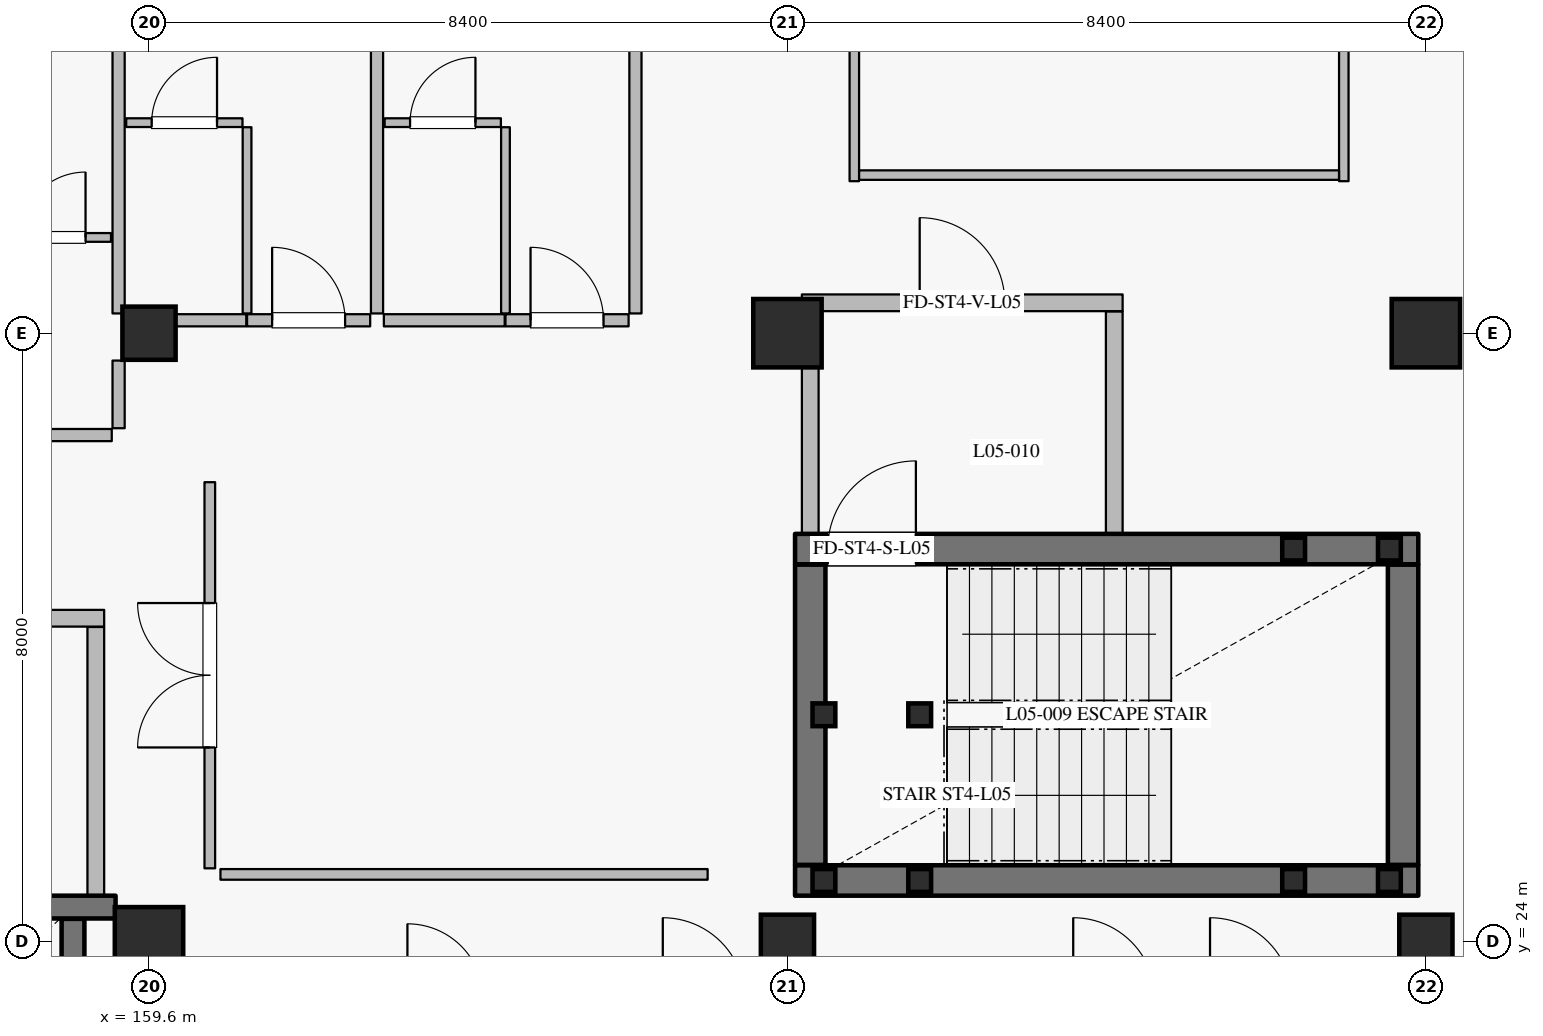
"""IFC4 building model, lengths in metres.
Left out: names, types, materials, properties, quantities, classifications, styles, units other than length and angle.
Written with IfcOpenShell. Run it as: python <this file> out.ifc"""

import sys

from ifc_helpers import new_model, si_unit, direction, frame, frame_2d, origin, origin_2d, place, context, subcontext, project, spatial, rectangle, hollow_rectangle, extrude, element, fill, save


model = new_model("IFC4")
c1 = context("Model", 3, precision=1e-05, world=origin(), true_north=direction((0.0, 1.0)))
c2 = subcontext(c1, "Body", "Model", "MODEL_VIEW")
j1 = project(units=[si_unit("LENGTHUNIT", "METRE"), si_unit("PLANEANGLEUNIT", "RADIAN")], contexts=[c1])
p1 = place(None, origin())
s1 = spatial("IfcSite", under=j1, at=p1, CompositionType="ELEMENT")
p2 = place(p1, origin())
s2 = spatial("IfcBuilding", under=s1, at=p2, CompositionType="ELEMENT")
p3 = place(p2, frame((0.0, 0.0, 25.2)))
s3 = spatial("IfcBuildingStorey", under=s2, at=p3, CompositionType="ELEMENT", Elevation=25.2)
for number, where, z_axis, x_axis in (
    (1, (159.6, 24.0, 0.0), (0.0, 0.0, 1.0), (1.0, 0.0, 0.0)),
    (2, (168.0, 32.0, 0.0), (0.0, 0.0, 1.0), (1.0, 0.0, 0.0)),
    (3, (176.4, 32.0, 0.0), (0.0, 0.0, 1.0), (1.0, 0.0, 0.0)),
):
    element("IfcColumn", number, at=place(p3, frame(where, z_axis=z_axis, x_axis=x_axis)), inside=s3, PredefinedType="COLUMN", context=c2, shape_type="SweptSolid", body=[
        extrude(rectangle(XDim=0.9, YDim=0.9, at=origin_2d()), origin(), (0.0, 0.0, 1.0), 3.6),
    ])
for number, where, z_axis, x_axis in (
    (4, (159.6, 32.0, 0.0), (0.0, 0.0, 1.0), (1.0, 0.0, 0.0)),
    (5, (168.0, 24.0, 0.0), (0.0, 0.0, 1.0), (1.0, 0.0, 0.0)),
    (6, (176.4, 24.0, 0.0), (0.0, 0.0, 1.0), (1.0, 0.0, 0.0)),
):
    element("IfcColumn", number, at=place(p3, frame(where, z_axis=z_axis, x_axis=x_axis)), inside=s3, PredefinedType="COLUMN", context=c2, shape_type="SweptSolid", body=[
        extrude(rectangle(XDim=0.7, YDim=0.7, at=origin_2d()), origin(), (0.0, 0.0, 1.0), 3.6),
    ])
p4 = place(p3, frame((158.6, 21.705, 0.0), z_axis=(0.0, 0.0, 1.0), x_axis=(0.0, 1.0, 0.0)))
e7 = element("IfcWall", 7, at=p4, inside=s3, PredefinedType="SHEAR", context=c2, shape_type="SweptSolid", body=[
    extrude(rectangle(XDim=2.59, YDim=0.3, at=frame_2d((1.295, 0.0))), origin(), (0.0, 0.0, 1.0), 3.335),
])
p5 = place(p3, frame((159.16, 24.45, 0.0), z_axis=(0.0, 0.0, 1.0), x_axis=(-1.0, 0.0, 0.0)))
e8 = element("IfcWall", 8, at=p5, inside=s3, PredefinedType="SHEAR", context=c2, shape_type="SweptSolid", body=[
    extrude(rectangle(XDim=3.91, YDim=0.3, at=frame_2d((1.955, 0.0))), origin(), (0.0, 0.0, 1.0), 3.335),
])
p6 = place(p5, frame((1.535, 0.0, 0.0)))
e9 = element("IfcOpeningElement", 9, at=p6, cuts=e8, PredefinedType="OPENING", context=c2, shape_type="SweptSolid", body=[
    extrude(rectangle(XDim=1.25, YDim=2.25, at=frame_2d((0.625, 1.125))), frame((0.0, 0.16, 0.0), z_axis=(0.0, -1.0, 0.0), x_axis=(1.0, 0.0, 0.0)), (0.0, 0.0, 1.0), 0.32),
])
p7 = place(p3, frame((158.9, 24.605, 0.0), z_axis=(0.0, 0.0, 1.0), x_axis=(0.0, 1.0, 0.0)))
e10 = element("IfcWall", 10, at=p7, inside=s3, PredefinedType="PARTITIONING", context=c2, shape_type="SweptSolid", body=[
    extrude(rectangle(XDim=3.53, YDim=0.22, at=frame_2d((1.765, 0.0))), origin(), (0.0, 0.0, 1.0), 3.335),
])
p8 = place(p3, frame((154.99, 28.25, 0.0), z_axis=(0.0, 0.0, 1.0), x_axis=(1.0, 0.0, 0.0)))
e11 = element("IfcWall", 11, at=p8, inside=s3, PredefinedType="PARTITIONING", context=c2, shape_type="SweptSolid", body=[
    extrude(rectangle(XDim=4.02, YDim=0.22, at=frame_2d((2.01, 0.0))), origin(), (0.0, 0.0, 1.0), 3.335),
])
p9 = place(p8, frame((1.39, 0.0, 0.0)))
e12 = element("IfcOpeningElement", 12, at=p9, cuts=e11, PredefinedType="OPENING", context=c2, shape_type="SweptSolid", body=[
    extrude(rectangle(XDim=1.24, YDim=2.2, at=frame_2d((0.62, 1.1))), frame((0.0, 0.12, 0.0), z_axis=(0.0, -1.0, 0.0), x_axis=(1.0, 0.0, 0.0)), (0.0, 0.0, 1.0), 0.24),
])
p10 = place(p3, frame((168.1, 24.8, 0.0), z_axis=(0.0, 0.0, 1.0), x_axis=(1.0, 0.0, 0.0)))
e13 = element("IfcWall", 13, at=p10, inside=s3, PredefinedType="SHEAR", context=c2, shape_type="SweptSolid", body=[
    extrude(rectangle(XDim=8.2, YDim=0.4, at=frame_2d((4.1, 0.0))), origin(), (0.0, 0.0, 1.0), 3.335),
])
p11 = place(p3, frame((176.1, 25.005, 0.0), z_axis=(0.0, 0.0, 1.0), x_axis=(0.0, 1.0, 0.0)))
e14 = element("IfcWall", 14, at=p11, inside=s3, PredefinedType="SHEAR", context=c2, shape_type="SweptSolid", body=[
    extrude(rectangle(XDim=3.95, YDim=0.4, at=frame_2d((1.975, 0.0))), origin(), (0.0, 0.0, 1.0), 3.335),
])
p12 = place(p3, frame((168.1, 29.16, 0.0), z_axis=(0.0, 0.0, 1.0), x_axis=(1.0, 0.0, 0.0)))
e15 = element("IfcWall", 15, at=p12, inside=s3, PredefinedType="SHEAR", context=c2, shape_type="SweptSolid", body=[
    extrude(rectangle(XDim=8.2, YDim=0.4, at=frame_2d((4.1, 0.0))), origin(), (0.0, 0.0, 1.0), 3.335),
])
p13 = place(p12, frame((0.43, 0.0, 0.0)))
e16 = element("IfcOpeningElement", 16, at=p13, cuts=e15, PredefinedType="OPENING", context=c2, shape_type="SweptSolid", body=[
    extrude(rectangle(XDim=1.16, YDim=2.2, at=frame_2d((0.58, 1.1))), frame((0.0, 0.21, 0.0), z_axis=(0.0, -1.0, 0.0), x_axis=(1.0, 0.0, 0.0)), (0.0, 0.0, 1.0), 0.42),
])
p14 = place(p3, frame((168.3, 25.005, 0.0), z_axis=(0.0, 0.0, 1.0), x_axis=(0.0, 1.0, 0.0)))
e17 = element("IfcWall", 17, at=p14, inside=s3, PredefinedType="SHEAR", context=c2, shape_type="SweptSolid", body=[
    extrude(rectangle(XDim=3.95, YDim=0.4, at=frame_2d((1.975, 0.0))), origin(), (0.0, 0.0, 1.0), 3.335),
])
p15 = place(p3, frame((168.3, 29.365, 0.0), z_axis=(0.0, 0.0, 1.0), x_axis=(0.0, 1.0, 0.0)))
e18 = element("IfcWall", 18, at=p15, inside=s3, PredefinedType="PARTITIONING", context=c2, shape_type="SweptSolid", body=[
    extrude(rectangle(XDim=2.92, YDim=0.22, at=frame_2d((1.46, 0.0))), origin(), (0.0, 0.0, 1.0), 3.335),
])
p16 = place(p3, frame((168.19, 32.4, 0.0), z_axis=(0.0, 0.0, 1.0), x_axis=(1.0, 0.0, 0.0)))
e19 = element("IfcWall", 19, at=p16, inside=s3, PredefinedType="PARTITIONING", context=c2, shape_type="SweptSolid", body=[
    extrude(rectangle(XDim=4.22, YDim=0.22, at=frame_2d((2.11, 0.0))), origin(), (0.0, 0.0, 1.0), 3.335),
])
p17 = place(p16, frame((1.55, 0.0, 0.0)))
e20 = element("IfcOpeningElement", 20, at=p17, cuts=e19, PredefinedType="OPENING", context=c2, shape_type="SweptSolid", body=[
    extrude(rectangle(XDim=1.12, YDim=2.2, at=frame_2d((0.56, 1.1))), frame((0.0, 0.12, 0.0), z_axis=(0.0, -1.0, 0.0), x_axis=(1.0, 0.0, 0.0)), (0.0, 0.0, 1.0), 0.24),
])
p18 = place(p3, frame((172.3, 29.365, 0.0), z_axis=(0.0, 0.0, 1.0), x_axis=(0.0, 1.0, 0.0)))
e21 = element("IfcWall", 21, at=p18, inside=s3, PredefinedType="PARTITIONING", context=c2, shape_type="SweptSolid", body=[
    extrude(rectangle(XDim=2.92, YDim=0.22, at=frame_2d((1.46, 0.0))), origin(), (0.0, 0.0, 1.0), 3.335),
])
for number, where, z_axis, x_axis in (
    (22, (168.48, 24.8, 0.0), (0.0, 0.0, 1.0), (1.0, 0.0, 0.0)),
    (23, (168.48, 26.98, 0.0), (0.0, 0.0, 1.0), (1.0, 0.0, 0.0)),
    (24, (169.74, 24.8, 0.0), (0.0, 0.0, 1.0), (1.0, 0.0, 0.0)),
    (25, (169.74, 26.98, 0.0), (0.0, 0.0, 1.0), (1.0, 0.0, 0.0)),
):
    element("IfcColumn", number, at=place(p3, frame(where, z_axis=z_axis, x_axis=x_axis)), inside=s3, PredefinedType="COLUMN", context=c2, shape_type="SweptSolid", body=[
        extrude(hollow_rectangle(XDim=0.3, YDim=0.3, WallThickness=0.012, at=origin_2d()), origin(), (0.0, 0.0, 1.0), 3.42),
    ])
for number, where, z_axis, x_axis in (
    (26, (174.66, 24.8, -2.1), (0.0, 0.0, 1.0), (1.0, 0.0, 0.0)),
    (27, (174.66, 29.16, -2.1), (0.0, 0.0, 1.0), (1.0, 0.0, 0.0)),
    (28, (175.92, 24.8, -2.1), (0.0, 0.0, 1.0), (1.0, 0.0, 0.0)),
    (29, (175.92, 29.16, -2.1), (0.0, 0.0, 1.0), (1.0, 0.0, 0.0)),
):
    element("IfcColumn", number, at=place(p3, frame(where, z_axis=z_axis, x_axis=x_axis)), inside=s3, PredefinedType="COLUMN", context=c2, shape_type="SweptSolid", body=[
        extrude(hollow_rectangle(XDim=0.3, YDim=0.3, WallThickness=0.012, at=origin_2d()), origin(), (0.0, 0.0, 1.0), 3.72),
    ])
p19 = place(p3, frame((157.52, 30.66, 0.0), z_axis=(0.0, 0.0, 1.0), x_axis=(1.0, 0.0, 0.0)))
e30 = element("IfcWall", 30, at=p19, inside=s3, PredefinedType="PARTITIONING", context=c2, shape_type="SweptSolid", body=[
    extrude(rectangle(XDim=1.59, YDim=0.16, at=frame_2d((0.795, 0.0))), origin(), (0.0, 0.0, 1.0), 3.335),
])
p20 = place(p3, frame((157.57, 33.26, 0.0), z_axis=(0.0, 0.0, 1.0), x_axis=(1.0, 0.0, 0.0)))
e31 = element("IfcWall", 31, at=p20, inside=s3, PredefinedType="PARTITIONING", context=c2, shape_type="SweptSolid", body=[
    extrude(rectangle(XDim=1.53, YDim=0.115, at=frame_2d((0.765, 0.0))), origin(), (0.0, 0.0, 1.0), 3.335),
])
p21 = place(p20, frame((0.335, 0.0, 0.0)))
e32 = element("IfcOpeningElement", 32, at=p21, cuts=e31, PredefinedType="OPENING", context=c2, shape_type="SweptSolid", body=[
    extrude(rectangle(XDim=0.86, YDim=2.12, at=frame_2d((0.43, 1.06))), frame((0.0, 0.067, 0.0), z_axis=(0.0, -1.0, 0.0), x_axis=(1.0, 0.0, 0.0)), (0.0, 0.0, 1.0), 0.135),
])
p22 = place(p3, frame((159.2, 30.75, 0.0), z_axis=(0.0, 0.0, 1.0), x_axis=(0.0, 1.0, 0.0)))
e33 = element("IfcWall", 33, at=p22, inside=s3, PredefinedType="PARTITIONING", context=c2, shape_type="SweptSolid", body=[
    extrude(rectangle(XDim=0.89, YDim=0.16, at=frame_2d((0.445, 0.0))), origin(), (0.0, 0.0, 1.0), 3.335),
])
p23 = place(p3, frame((159.29, 32.17, 0.0), z_axis=(0.0, 0.0, 1.0), x_axis=(1.0, 0.0, 0.0)))
e34 = element("IfcWall", 34, at=p23, inside=s3, PredefinedType="PARTITIONING", context=c2, shape_type="SweptSolid", body=[
    extrude(rectangle(XDim=1.59, YDim=0.16, at=frame_2d((0.795, 0.0))), origin(), (0.0, 0.0, 1.0), 3.335),
])
p24 = place(p3, frame((160.89, 32.17, 0.0), z_axis=(0.0, 0.0, 1.0), x_axis=(1.0, 0.0, 0.0)))
e35 = element("IfcWall", 35, at=p24, inside=s3, PredefinedType="PARTITIONING", context=c2, shape_type="SweptSolid", body=[
    extrude(rectangle(XDim=1.62, YDim=0.16, at=frame_2d((0.81, 0.0))), origin(), (0.0, 0.0, 1.0), 3.335),
])
p25 = place(p24, frame((0.33, 0.0, 0.0)))
e36 = element("IfcOpeningElement", 36, at=p25, cuts=e35, PredefinedType="OPENING", context=c2, shape_type="SweptSolid", body=[
    extrude(rectangle(XDim=0.96, YDim=2.2, at=frame_2d((0.48, 1.1))), frame((0.0, 0.09, 0.0), z_axis=(0.0, -1.0, 0.0), x_axis=(1.0, 0.0, 0.0)), (0.0, 0.0, 1.0), 0.18),
])
p26 = place(p3, frame((160.89, 32.26, 0.0), z_axis=(0.0, 0.0, 1.0), x_axis=(0.0, 1.0, 0.0)))
e37 = element("IfcWall", 37, at=p26, inside=s3, PredefinedType="PARTITIONING", context=c2, shape_type="SweptSolid", body=[
    extrude(rectangle(XDim=2.45, YDim=0.115, at=frame_2d((1.225, 0.0))), origin(), (0.0, 0.0, 1.0), 3.335),
])
p27 = place(p3, frame((159.3, 34.77, 0.0), z_axis=(0.0, 0.0, 1.0), x_axis=(1.0, 0.0, 0.0)))
e38 = element("IfcWall", 38, at=p27, inside=s3, PredefinedType="PARTITIONING", context=c2, shape_type="SweptSolid", body=[
    extrude(rectangle(XDim=1.53, YDim=0.115, at=frame_2d((0.765, 0.0))), origin(), (0.0, 0.0, 1.0), 3.335),
])
p28 = place(p27, frame((0.335, 0.0, 0.0)))
e39 = element("IfcOpeningElement", 39, at=p28, cuts=e38, PredefinedType="OPENING", context=c2, shape_type="SweptSolid", body=[
    extrude(rectangle(XDim=0.86, YDim=2.12, at=frame_2d((0.43, 1.06))), frame((0.0, 0.067, 0.0), z_axis=(0.0, -1.0, 0.0), x_axis=(1.0, 0.0, 0.0)), (0.0, 0.0, 1.0), 0.135),
])
p29 = place(p3, frame((159.2, 32.26, 0.0), z_axis=(0.0, 0.0, 1.0), x_axis=(0.0, 1.0, 0.0)))
e40 = element("IfcWall", 40, at=p29, inside=s3, PredefinedType="PARTITIONING", context=c2, shape_type="SweptSolid", body=[
    extrude(rectangle(XDim=7.4, YDim=0.16, at=frame_2d((3.7, 0.0))), origin(), (0.0, 0.0, 1.0), 3.335),
])
p30 = place(p3, frame((162.69, 32.17, 0.0), z_axis=(0.0, 0.0, 1.0), x_axis=(1.0, 0.0, 0.0)))
e41 = element("IfcWall", 41, at=p30, inside=s3, PredefinedType="PARTITIONING", context=c2, shape_type="SweptSolid", body=[
    extrude(rectangle(XDim=1.59, YDim=0.16, at=frame_2d((0.795, 0.0))), origin(), (0.0, 0.0, 1.0), 3.335),
])
p31 = place(p3, frame((164.29, 32.17, 0.0), z_axis=(0.0, 0.0, 1.0), x_axis=(1.0, 0.0, 0.0)))
e42 = element("IfcWall", 42, at=p31, inside=s3, PredefinedType="PARTITIONING", context=c2, shape_type="SweptSolid", body=[
    extrude(rectangle(XDim=1.62, YDim=0.16, at=frame_2d((0.81, 0.0))), origin(), (0.0, 0.0, 1.0), 3.335),
])
p32 = place(p31, frame((0.33, 0.0, 0.0)))
e43 = element("IfcOpeningElement", 43, at=p32, cuts=e42, PredefinedType="OPENING", context=c2, shape_type="SweptSolid", body=[
    extrude(rectangle(XDim=0.96, YDim=2.2, at=frame_2d((0.48, 1.1))), frame((0.0, 0.09, 0.0), z_axis=(0.0, -1.0, 0.0), x_axis=(1.0, 0.0, 0.0)), (0.0, 0.0, 1.0), 0.18),
])
p33 = place(p3, frame((164.29, 32.26, 0.0), z_axis=(0.0, 0.0, 1.0), x_axis=(0.0, 1.0, 0.0)))
e44 = element("IfcWall", 44, at=p33, inside=s3, PredefinedType="PARTITIONING", context=c2, shape_type="SweptSolid", body=[
    extrude(rectangle(XDim=2.45, YDim=0.115, at=frame_2d((1.225, 0.0))), origin(), (0.0, 0.0, 1.0), 3.335),
])
p34 = place(p3, frame((162.7, 34.77, 0.0), z_axis=(0.0, 0.0, 1.0), x_axis=(1.0, 0.0, 0.0)))
e45 = element("IfcWall", 45, at=p34, inside=s3, PredefinedType="PARTITIONING", context=c2, shape_type="SweptSolid", body=[
    extrude(rectangle(XDim=1.53, YDim=0.115, at=frame_2d((0.765, 0.0))), origin(), (0.0, 0.0, 1.0), 3.335),
])
p35 = place(p34, frame((0.335, 0.0, 0.0)))
e46 = element("IfcOpeningElement", 46, at=p35, cuts=e45, PredefinedType="OPENING", context=c2, shape_type="SweptSolid", body=[
    extrude(rectangle(XDim=0.86, YDim=2.12, at=frame_2d((0.43, 1.06))), frame((0.0, 0.067, 0.0), z_axis=(0.0, -1.0, 0.0), x_axis=(1.0, 0.0, 0.0)), (0.0, 0.0, 1.0), 0.135),
])
p36 = place(p3, frame((162.6, 32.26, 0.0), z_axis=(0.0, 0.0, 1.0), x_axis=(0.0, 1.0, 0.0)))
e47 = element("IfcWall", 47, at=p36, inside=s3, PredefinedType="PARTITIONING", context=c2, shape_type="SweptSolid", body=[
    extrude(rectangle(XDim=10.26, YDim=0.16, at=frame_2d((5.13, 0.0))), origin(), (0.0, 0.0, 1.0), 3.335),
])
p37 = place(p3, frame((166.0, 32.26, 0.0), z_axis=(0.0, 0.0, 1.0), x_axis=(0.0, 1.0, 0.0)))
e48 = element("IfcWall", 48, at=p37, inside=s3, PredefinedType="PARTITIONING", context=c2, shape_type="SweptSolid", body=[
    extrude(rectangle(XDim=8.64, YDim=0.16, at=frame_2d((4.32, 0.0))), origin(), (0.0, 0.0, 1.0), 3.335),
])
p38 = place(p3, frame((160.4, 24.96, 0.0), z_axis=(0.0, 0.0, 1.0), x_axis=(0.0, 1.0, 0.0)))
e49 = element("IfcWall", 49, at=p38, inside=s3, PredefinedType="PARTITIONING", context=c2, shape_type="SweptSolid", body=[
    extrude(rectangle(XDim=5.08, YDim=0.14, at=frame_2d((2.54, 0.0))), origin(), (0.0, 0.0, 1.0), 3.335),
])
p39 = place(p38, frame((1.59, 0.0, 0.0)))
e50 = element("IfcOpeningElement", 50, at=p39, cuts=e49, PredefinedType="OPENING", context=c2, shape_type="SweptSolid", body=[
    extrude(rectangle(XDim=1.9, YDim=2.4, at=frame_2d((0.95, 1.2))), frame((0.0, 0.08, 0.0), z_axis=(0.0, -1.0, 0.0), x_axis=(1.0, 0.0, 0.0)), (0.0, 0.0, 1.0), 0.16),
])
p40 = place(p3, frame((160.54, 24.88, 0.0), z_axis=(0.0, 0.0, 1.0), x_axis=(1.0, 0.0, 0.0)))
e51 = element("IfcWall", 51, at=p40, inside=s3, PredefinedType="PARTITIONING", context=c2, shape_type="SweptSolid", body=[
    extrude(rectangle(XDim=6.41, YDim=0.14, at=frame_2d((3.205, 0.0))), origin(), (0.0, 0.0, 1.0), 3.335),
])
for number, where, z_axis, x_axis in (
    (52, (168.88, 34.0, 0.0), (0.0, 0.0, 1.0), (0.0, 1.0, 0.0)),
    (53, (175.32, 34.0, 0.0), (0.0, 0.0, 1.0), (0.0, 1.0, 0.0)),
):
    element("IfcWall", number, at=place(p3, frame(where, z_axis=z_axis, x_axis=x_axis)), inside=s3, PredefinedType="PARTITIONING", context=c2, shape_type="SweptSolid", body=[
        extrude(rectangle(XDim=2.496, YDim=0.125, at=frame_2d((1.248, 0.0))), origin(), (0.0, 0.0, 1.0), 3.335),
    ])
p41 = place(p3, frame((168.943, 34.08, 0.0), z_axis=(0.0, 0.0, 1.0), x_axis=(1.0, 0.0, 0.0)))
e54 = element("IfcWall", 54, at=p41, inside=s3, PredefinedType="PARTITIONING", context=c2, shape_type="SweptSolid", body=[
    extrude(rectangle(XDim=6.314, YDim=0.125, at=frame_2d((3.157, 0.0))), origin(), (0.0, 0.0, 1.0), 3.335),
])
p42 = place(p13, origin())
e55 = element("IfcDoor", 55, at=p42, inside=s3, OperationType="SINGLE_SWING_RIGHT", PredefinedType="DOOR", context=c2, shape_type="SweptSolid", body=[
    extrude(rectangle(XDim=1.16, YDim=2.2, at=frame_2d((0.58, 1.1))), frame((0.0, 0.025, 0.0), z_axis=(0.0, -1.0, 0.0), x_axis=(1.0, 0.0, 0.0)), (0.0, 0.0, 1.0), 0.05),
])
fill(e16, e55)
p43 = place(p17, origin())
e56 = element("IfcDoor", 56, at=p43, inside=s3, OperationType="SINGLE_SWING_LEFT", PredefinedType="DOOR", context=c2, shape_type="SweptSolid", body=[
    extrude(rectangle(XDim=1.12, YDim=2.2, at=frame_2d((0.56, 1.1))), frame((0.0, 0.025, 0.0), z_axis=(0.0, -1.0, 0.0), x_axis=(1.0, 0.0, 0.0)), (0.0, 0.0, 1.0), 0.05),
])
fill(e20, e56)
p44 = place(p21, origin())
e57 = element("IfcDoor", 57, at=p44, inside=s3, OperationType="SINGLE_SWING_RIGHT", PredefinedType="DOOR", context=c2, shape_type="SweptSolid", body=[
    extrude(rectangle(XDim=0.86, YDim=2.12, at=frame_2d((0.43, 1.06))), frame((0.0, 0.025, 0.0), z_axis=(0.0, -1.0, 0.0), x_axis=(1.0, 0.0, 0.0)), (0.0, 0.0, 1.0), 0.05),
])
fill(e32, e57)
p45 = place(p25, origin())
e58 = element("IfcDoor", 58, at=p45, inside=s3, OperationType="SINGLE_SWING_LEFT", PredefinedType="DOOR", context=c2, shape_type="SweptSolid", body=[
    extrude(rectangle(XDim=0.96, YDim=2.2, at=frame_2d((0.48, 1.1))), frame((0.0, 0.025, 0.0), z_axis=(0.0, -1.0, 0.0), x_axis=(1.0, 0.0, 0.0)), (0.0, 0.0, 1.0), 0.05),
])
fill(e36, e58)
p46 = place(p28, origin())
e59 = element("IfcDoor", 59, at=p46, inside=s3, OperationType="SINGLE_SWING_RIGHT", PredefinedType="DOOR", context=c2, shape_type="SweptSolid", body=[
    extrude(rectangle(XDim=0.86, YDim=2.12, at=frame_2d((0.43, 1.06))), frame((0.0, 0.025, 0.0), z_axis=(0.0, -1.0, 0.0), x_axis=(1.0, 0.0, 0.0)), (0.0, 0.0, 1.0), 0.05),
])
fill(e39, e59)
p47 = place(p32, origin())
e60 = element("IfcDoor", 60, at=p47, inside=s3, OperationType="SINGLE_SWING_LEFT", PredefinedType="DOOR", context=c2, shape_type="SweptSolid", body=[
    extrude(rectangle(XDim=0.96, YDim=2.2, at=frame_2d((0.48, 1.1))), frame((0.0, 0.025, 0.0), z_axis=(0.0, -1.0, 0.0), x_axis=(1.0, 0.0, 0.0)), (0.0, 0.0, 1.0), 0.05),
])
fill(e43, e60)
p48 = place(p35, origin())
e61 = element("IfcDoor", 61, at=p48, inside=s3, OperationType="SINGLE_SWING_RIGHT", PredefinedType="DOOR", context=c2, shape_type="SweptSolid", body=[
    extrude(rectangle(XDim=0.86, YDim=2.12, at=frame_2d((0.43, 1.06))), frame((0.0, 0.025, 0.0), z_axis=(0.0, -1.0, 0.0), x_axis=(1.0, 0.0, 0.0)), (0.0, 0.0, 1.0), 0.05),
])
fill(e46, e61)
p49 = place(p39, origin())
e62 = element("IfcDoor", 62, at=p49, inside=s3, OperationType="DOUBLE_DOOR_SINGLE_SWING", PredefinedType="DOOR", context=c2, shape_type="SweptSolid", body=[
    extrude(rectangle(XDim=1.9, YDim=2.4, at=frame_2d((0.95, 1.2))), frame((0.0, 0.025, 0.0), z_axis=(0.0, -1.0, 0.0), x_axis=(1.0, 0.0, 0.0)), (0.0, 0.0, 1.0), 0.05),
])
fill(e50, e62)
save(model, sys.argv[1])
